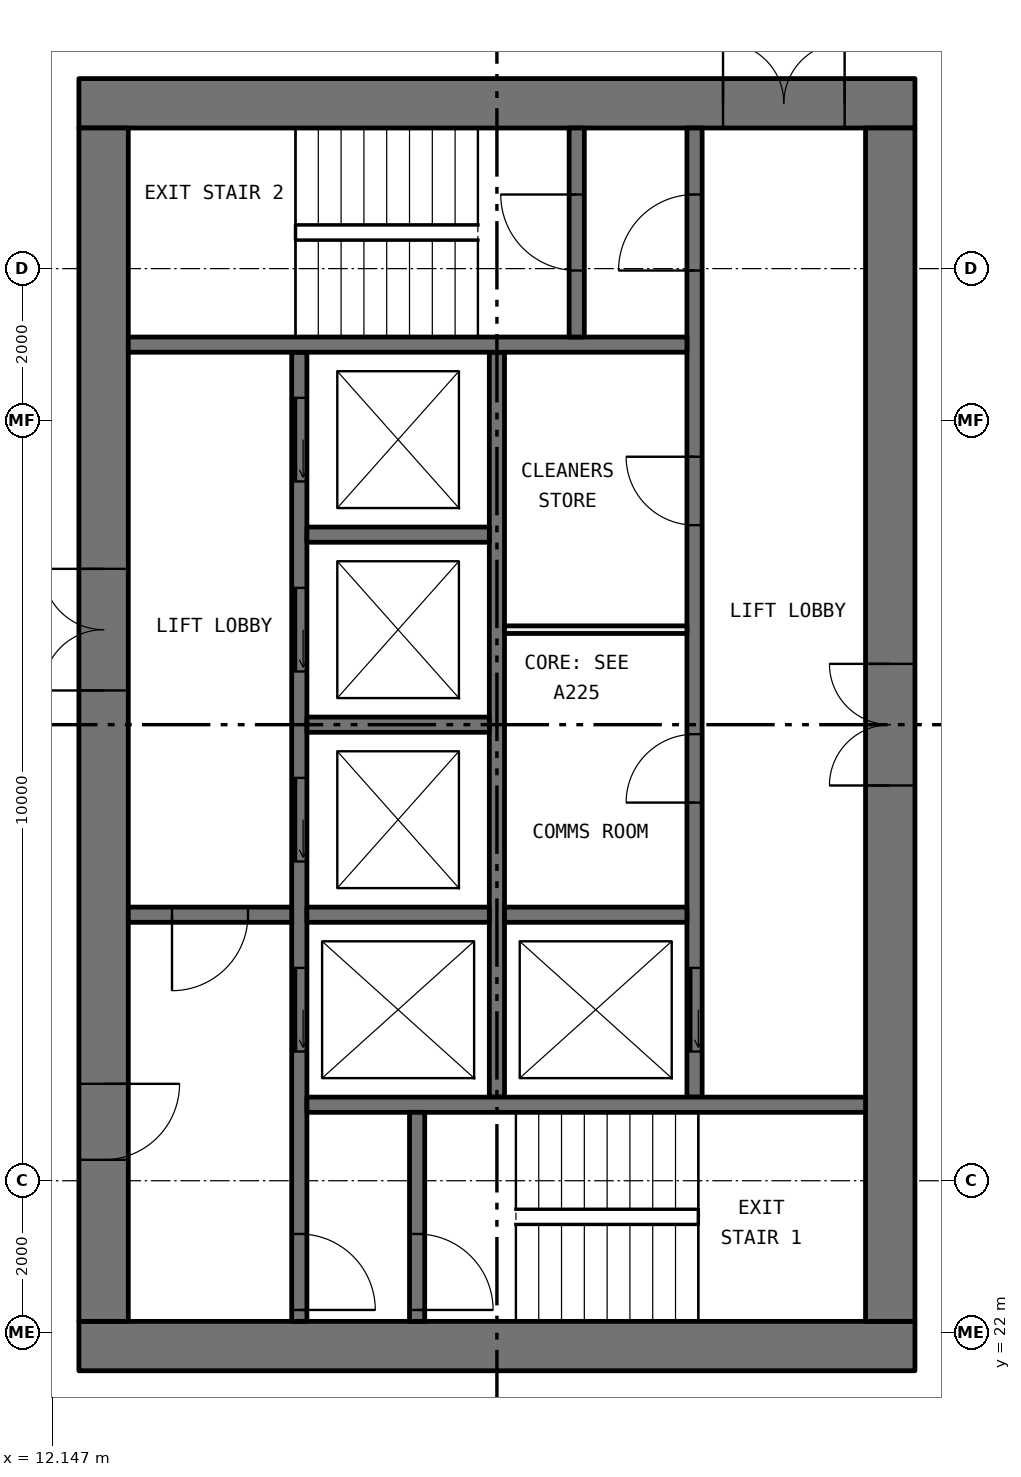
"""IFC4 building model, lengths in metres.
Left out: names, types, materials, properties, quantities, classifications, styles, units other than length and angle.
Written with IfcOpenShell. Run it as: python <this file> out.ifc"""

import sys

from ifc_helpers import new_model, si_unit, direction, frame, frame_2d, origin, place, context, subcontext, project, spatial, rectangle, extrude, element, fill, save


model = new_model("IFC4")
c1 = context("Model", 3, precision=1e-05, world=origin(), true_north=direction((0.0, 1.0)))
c2 = subcontext(c1, "Body", "Model", "MODEL_VIEW")
j1 = project(units=[si_unit("LENGTHUNIT", "METRE"), si_unit("PLANEANGLEUNIT", "RADIAN")], contexts=[c1])
p1 = place(None, origin())
s1 = spatial("IfcSite", under=j1, at=p1, CompositionType="ELEMENT")
p2 = place(p1, origin())
s2 = spatial("IfcBuilding", under=s1, at=p2, CompositionType="ELEMENT")
p3 = place(p2, frame((0.0, 0.0, 96.6)))
s3 = spatial("IfcBuildingStorey", under=s2, at=p3, CompositionType="ELEMENT", Elevation=96.6)
p4 = place(p3, frame((12.5, 21.825, 0.0), z_axis=(0.0, 0.0, 1.0), x_axis=(1.0, 0.0, 0.0)))
e1 = element("IfcWall", 1, at=p4, inside=s3, PredefinedType="SHEAR", context=c2, shape_type="SweptSolid", body=[
    extrude(rectangle(XDim=11.0, YDim=0.65, at=frame_2d((5.5, 0.0))), origin(), (0.0, 0.0, 1.0), 3.05),
])
p5 = place(p3, frame((12.5, 38.175, 0.0), z_axis=(0.0, 0.0, 1.0), x_axis=(1.0, 0.0, 0.0)))
e2 = element("IfcWall", 2, at=p5, inside=s3, PredefinedType="SHEAR", context=c2, shape_type="SweptSolid", body=[
    extrude(rectangle(XDim=11.0, YDim=0.65, at=frame_2d((5.5, 0.0))), origin(), (0.0, 0.0, 1.0), 3.05),
])
p6 = place(p5, frame((8.475, 0.0, 0.0)))
e3 = element("IfcOpeningElement", 3, at=p6, cuts=e2, PredefinedType="OPENING", context=c2, shape_type="SweptSolid", body=[
    extrude(rectangle(XDim=1.6, YDim=2.1, at=frame_2d((0.8, 1.05))), frame((0.0, 0.335, 0.0), z_axis=(0.0, -1.0, 0.0), x_axis=(1.0, 0.0, 0.0)), (0.0, 0.0, 1.0), 0.67),
])
p7 = place(p3, frame((12.825, 22.15, 0.0), z_axis=(0.0, 0.0, 1.0), x_axis=(0.0, 1.0, 0.0)))
e4 = element("IfcWall", 4, at=p7, inside=s3, PredefinedType="SHEAR", context=c2, shape_type="SweptSolid", body=[
    extrude(rectangle(XDim=15.7, YDim=0.65, at=frame_2d((7.85, 0.0))), origin(), (0.0, 0.0, 1.0), 3.05),
])
p8 = place(p7, frame((8.3, 0.0, 0.0)))
e5 = element("IfcOpeningElement", 5, at=p8, cuts=e4, PredefinedType="OPENING", context=c2, shape_type="SweptSolid", body=[
    extrude(rectangle(XDim=1.6, YDim=2.1, at=frame_2d((0.8, 1.05))), frame((0.0, 0.335, 0.0), z_axis=(0.0, -1.0, 0.0), x_axis=(1.0, 0.0, 0.0)), (0.0, 0.0, 1.0), 0.67),
])
p9 = place(p7, frame((2.125, 0.0, 0.0)))
e6 = element("IfcOpeningElement", 6, at=p9, cuts=e4, PredefinedType="OPENING", context=c2, shape_type="SweptSolid", body=[
    extrude(rectangle(XDim=1.0, YDim=2.1, at=frame_2d((0.5, 1.05))), frame((0.0, 0.335, 0.0), z_axis=(0.0, -1.0, 0.0), x_axis=(1.0, 0.0, 0.0)), (0.0, 0.0, 1.0), 0.67),
])
p10 = place(p3, frame((23.175, 22.15, 0.0), z_axis=(0.0, 0.0, 1.0), x_axis=(0.0, 1.0, 0.0)))
e7 = element("IfcWall", 7, at=p10, inside=s3, PredefinedType="SHEAR", context=c2, shape_type="SweptSolid", body=[
    extrude(rectangle(XDim=15.7, YDim=0.65, at=frame_2d((7.85, 0.0))), origin(), (0.0, 0.0, 1.0), 3.05),
])
p11 = place(p10, frame((7.05, 0.0, 0.0)))
e8 = element("IfcOpeningElement", 8, at=p11, cuts=e7, PredefinedType="OPENING", context=c2, shape_type="SweptSolid", body=[
    extrude(rectangle(XDim=1.6, YDim=2.1, at=frame_2d((0.8, 1.05))), frame((0.0, 0.335, 0.0), z_axis=(0.0, -1.0, 0.0), x_axis=(1.0, 0.0, 0.0)), (0.0, 0.0, 1.0), 0.67),
])
p12 = place(p3, frame((15.4, 22.15, 0.0), z_axis=(0.0, 0.0, 1.0), x_axis=(0.0, 1.0, 0.0)))
e9 = element("IfcWall", 9, at=p12, inside=s3, PredefinedType="SOLIDWALL", context=c2, shape_type="SweptSolid", body=[
    extrude(rectangle(XDim=12.75, YDim=0.2, at=frame_2d((6.375, 0.0))), origin(), (0.0, 0.0, 1.0), 3.05),
])
p13 = place(p12, frame((3.55, 0.0, 0.0)))
e10 = element("IfcOpeningElement", 10, at=p13, cuts=e9, PredefinedType="OPENING", context=c2, shape_type="SweptSolid", body=[
    extrude(rectangle(XDim=1.1, YDim=2.1, at=frame_2d((0.55, 1.05))), frame((0.0, 0.11, 0.0), z_axis=(0.0, -1.0, 0.0), x_axis=(1.0, 0.0, 0.0)), (0.0, 0.0, 1.0), 0.22),
])
p14 = place(p12, frame((6.05, 0.0, 0.0)))
e11 = element("IfcOpeningElement", 11, at=p14, cuts=e9, PredefinedType="OPENING", context=c2, shape_type="SweptSolid", body=[
    extrude(rectangle(XDim=1.1, YDim=2.1, at=frame_2d((0.55, 1.05))), frame((0.0, 0.11, 0.0), z_axis=(0.0, -1.0, 0.0), x_axis=(1.0, 0.0, 0.0)), (0.0, 0.0, 1.0), 0.22),
])
p15 = place(p12, frame((8.55, 0.0, 0.0)))
e12 = element("IfcOpeningElement", 12, at=p15, cuts=e9, PredefinedType="OPENING", context=c2, shape_type="SweptSolid", body=[
    extrude(rectangle(XDim=1.1, YDim=2.1, at=frame_2d((0.55, 1.05))), frame((0.0, 0.11, 0.0), z_axis=(0.0, -1.0, 0.0), x_axis=(1.0, 0.0, 0.0)), (0.0, 0.0, 1.0), 0.22),
])
p16 = place(p12, frame((11.05, 0.0, 0.0)))
e13 = element("IfcOpeningElement", 13, at=p16, cuts=e9, PredefinedType="OPENING", context=c2, shape_type="SweptSolid", body=[
    extrude(rectangle(XDim=1.1, YDim=2.1, at=frame_2d((0.55, 1.05))), frame((0.0, 0.11, 0.0), z_axis=(0.0, -1.0, 0.0), x_axis=(1.0, 0.0, 0.0)), (0.0, 0.0, 1.0), 0.22),
])
p17 = place(p12, frame((0.15, 0.0, 0.0)))
e14 = element("IfcOpeningElement", 14, at=p17, cuts=e9, PredefinedType="OPENING", context=c2, shape_type="SweptSolid", body=[
    extrude(rectangle(XDim=1.0, YDim=2.1, at=frame_2d((0.5, 1.05))), frame((0.0, 0.11, 0.0), z_axis=(0.0, -1.0, 0.0), x_axis=(1.0, 0.0, 0.0)), (0.0, 0.0, 1.0), 0.22),
])
p18 = place(p3, frame((20.6, 25.1, 0.0), z_axis=(0.0, 0.0, 1.0), x_axis=(0.0, 1.0, 0.0)))
e15 = element("IfcWall", 15, at=p18, inside=s3, PredefinedType="SOLIDWALL", context=c2, shape_type="SweptSolid", body=[
    extrude(rectangle(XDim=12.75, YDim=0.2, at=frame_2d((6.375, 0.0))), origin(), (0.0, 0.0, 1.0), 3.05),
])
p19 = place(p18, frame((0.6, 0.0, 0.0)))
e16 = element("IfcOpeningElement", 16, at=p19, cuts=e15, PredefinedType="OPENING", context=c2, shape_type="SweptSolid", body=[
    extrude(rectangle(XDim=1.1, YDim=2.1, at=frame_2d((0.55, 1.05))), frame((0.0, 0.11, 0.0), z_axis=(0.0, -1.0, 0.0), x_axis=(1.0, 0.0, 0.0)), (0.0, 0.0, 1.0), 0.22),
])
p20 = place(p18, frame((10.875, 0.0, 0.0)))
e17 = element("IfcOpeningElement", 17, at=p20, cuts=e15, PredefinedType="OPENING", context=c2, shape_type="SweptSolid", body=[
    extrude(rectangle(XDim=1.0, YDim=2.1, at=frame_2d((0.5, 1.05))), frame((0.0, 0.11, 0.0), z_axis=(0.0, -1.0, 0.0), x_axis=(1.0, 0.0, 0.0)), (0.0, 0.0, 1.0), 0.22),
])
p21 = place(p18, frame((3.875, 0.0, 0.0)))
e18 = element("IfcOpeningElement", 18, at=p21, cuts=e15, PredefinedType="OPENING", context=c2, shape_type="SweptSolid", body=[
    extrude(rectangle(XDim=0.9, YDim=2.1, at=frame_2d((0.45, 1.05))), frame((0.0, 0.11, 0.0), z_axis=(0.0, -1.0, 0.0), x_axis=(1.0, 0.0, 0.0)), (0.0, 0.0, 1.0), 0.22),
])
p22 = place(p18, frame((7.525, 0.0, 0.0)))
e19 = element("IfcOpeningElement", 19, at=p22, cuts=e15, PredefinedType="OPENING", context=c2, shape_type="SweptSolid", body=[
    extrude(rectangle(XDim=0.9, YDim=2.1, at=frame_2d((0.45, 1.05))), frame((0.0, 0.11, 0.0), z_axis=(0.0, -1.0, 0.0), x_axis=(1.0, 0.0, 0.0)), (0.0, 0.0, 1.0), 0.22),
])
p23 = place(p3, frame((18.0, 25.1, 0.0), z_axis=(0.0, 0.0, 1.0), x_axis=(0.0, 1.0, 0.0)))
e20 = element("IfcWall", 20, at=p23, inside=s3, PredefinedType="SOLIDWALL", context=c2, shape_type="SweptSolid", body=[
    extrude(rectangle(XDim=9.8, YDim=0.2, at=frame_2d((4.9, 0.0))), origin(), (0.0, 0.0, 1.0), 3.05),
])
for number, where, z_axis, x_axis in (
    (21, (15.5, 25.0, 0.0), (0.0, 0.0, 1.0), (1.0, 0.0, 0.0)),
    (22, (13.15, 35.0, 0.0), (0.0, 0.0, 1.0), (1.0, 0.0, 0.0)),
):
    element("IfcWall", number, at=place(p3, frame(where, z_axis=z_axis, x_axis=x_axis)), inside=s3, PredefinedType="SOLIDWALL", context=c2, shape_type="SweptSolid", body=[
        extrude(rectangle(XDim=7.35, YDim=0.2, at=frame_2d((3.675, 0.0))), origin(), (0.0, 0.0, 1.0), 3.05),
    ])
p24 = place(p3, frame((13.15, 27.5, 0.0), z_axis=(0.0, 0.0, 1.0), x_axis=(1.0, 0.0, 0.0)))
e23 = element("IfcWall", 23, at=p24, inside=s3, PredefinedType="SOLIDWALL", context=c2, shape_type="SweptSolid", body=[
    extrude(rectangle(XDim=2.15, YDim=0.2, at=frame_2d((1.075, 0.0))), origin(), (0.0, 0.0, 1.0), 3.05),
])
p25 = place(p24, frame((0.575, 0.0, 0.0)))
e24 = element("IfcOpeningElement", 24, at=p25, cuts=e23, PredefinedType="OPENING", context=c2, shape_type="SweptSolid", body=[
    extrude(rectangle(XDim=1.0, YDim=2.1, at=frame_2d((0.5, 1.05))), frame((0.0, 0.11, 0.0), z_axis=(0.0, -1.0, 0.0), x_axis=(1.0, 0.0, 0.0)), (0.0, 0.0, 1.0), 0.22),
])
p26 = place(p3, frame((16.95, 22.15, 0.0), z_axis=(0.0, 0.0, 1.0), x_axis=(0.0, 1.0, 0.0)))
e25 = element("IfcWall", 25, at=p26, inside=s3, PredefinedType="SOLIDWALL", context=c2, shape_type="SweptSolid", body=[
    extrude(rectangle(XDim=2.75, YDim=0.2, at=frame_2d((1.375, 0.0))), origin(), (0.0, 0.0, 1.0), 3.05),
])
p27 = place(p26, frame((0.15, 0.0, 0.0)))
e26 = element("IfcOpeningElement", 26, at=p27, cuts=e25, PredefinedType="OPENING", context=c2, shape_type="SweptSolid", body=[
    extrude(rectangle(XDim=1.0, YDim=2.1, at=frame_2d((0.5, 1.05))), frame((0.0, 0.11, 0.0), z_axis=(0.0, -1.0, 0.0), x_axis=(1.0, 0.0, 0.0)), (0.0, 0.0, 1.0), 0.22),
])
p28 = place(p3, frame((19.05, 35.1, 0.0), z_axis=(0.0, 0.0, 1.0), x_axis=(0.0, 1.0, 0.0)))
e27 = element("IfcWall", 27, at=p28, inside=s3, PredefinedType="SOLIDWALL", context=c2, shape_type="SweptSolid", body=[
    extrude(rectangle(XDim=2.75, YDim=0.2, at=frame_2d((1.375, 0.0))), origin(), (0.0, 0.0, 1.0), 3.05),
])
p29 = place(p28, frame((0.875, 0.0, 0.0)))
e28 = element("IfcOpeningElement", 28, at=p29, cuts=e27, PredefinedType="OPENING", context=c2, shape_type="SweptSolid", body=[
    extrude(rectangle(XDim=1.0, YDim=2.1, at=frame_2d((0.5, 1.05))), frame((0.0, 0.11, 0.0), z_axis=(0.0, -1.0, 0.0), x_axis=(1.0, 0.0, 0.0)), (0.0, 0.0, 1.0), 0.22),
])
for number, where, z_axis, x_axis in (
    (29, (15.5, 27.5, 0.0), (0.0, 0.0, 1.0), (1.0, 0.0, 0.0)),
    (30, (15.5, 30.0, 0.0), (0.0, 0.0, 1.0), (1.0, 0.0, 0.0)),
    (31, (15.5, 32.5, 0.0), (0.0, 0.0, 1.0), (1.0, 0.0, 0.0)),
    (32, (18.1, 27.5, 0.0), (0.0, 0.0, 1.0), (1.0, 0.0, 0.0)),
):
    element("IfcWall", number, at=place(p3, frame(where, z_axis=z_axis, x_axis=x_axis)), inside=s3, PredefinedType="SOLIDWALL", context=c2, shape_type="SweptSolid", body=[
        extrude(rectangle(XDim=2.4, YDim=0.2, at=frame_2d((1.2, 0.0))), origin(), (0.0, 0.0, 1.0), 3.05),
    ])
p30 = place(p3, frame((18.1, 31.25, 0.0), z_axis=(0.0, 0.0, 1.0), x_axis=(1.0, 0.0, 0.0)))
e33 = element("IfcWall", 33, at=p30, inside=s3, PredefinedType="PARTITIONING", context=c2, shape_type="SweptSolid", body=[
    extrude(rectangle(XDim=2.4, YDim=0.1, at=frame_2d((1.2, 0.0))), origin(), (0.0, 0.0, 1.0), 3.05),
])
p31 = place(p19, origin())
e34 = element("IfcDoor", 34, at=p31, inside=s3, OperationType="SLIDING_TO_LEFT", PredefinedType="DOOR", context=c2, shape_type="SweptSolid", body=[
    extrude(rectangle(XDim=1.1, YDim=2.1, at=frame_2d((0.55, 1.05))), frame((0.0, 0.025, 0.0), z_axis=(0.0, -1.0, 0.0), x_axis=(1.0, 0.0, 0.0)), (0.0, 0.0, 1.0), 0.05),
])
fill(e16, e34)
p32 = place(p13, origin())
e35 = element("IfcDoor", 35, at=p32, inside=s3, OperationType="SLIDING_TO_LEFT", PredefinedType="DOOR", context=c2, shape_type="SweptSolid", body=[
    extrude(rectangle(XDim=1.1, YDim=2.1, at=frame_2d((0.55, 1.05))), frame((0.0, 0.025, 0.0), z_axis=(0.0, -1.0, 0.0), x_axis=(1.0, 0.0, 0.0)), (0.0, 0.0, 1.0), 0.05),
])
fill(e10, e35)
p33 = place(p14, origin())
e36 = element("IfcDoor", 36, at=p33, inside=s3, OperationType="SLIDING_TO_LEFT", PredefinedType="DOOR", context=c2, shape_type="SweptSolid", body=[
    extrude(rectangle(XDim=1.1, YDim=2.1, at=frame_2d((0.55, 1.05))), frame((0.0, 0.025, 0.0), z_axis=(0.0, -1.0, 0.0), x_axis=(1.0, 0.0, 0.0)), (0.0, 0.0, 1.0), 0.05),
])
fill(e11, e36)
p34 = place(p15, origin())
e37 = element("IfcDoor", 37, at=p34, inside=s3, OperationType="SLIDING_TO_LEFT", PredefinedType="DOOR", context=c2, shape_type="SweptSolid", body=[
    extrude(rectangle(XDim=1.1, YDim=2.1, at=frame_2d((0.55, 1.05))), frame((0.0, 0.025, 0.0), z_axis=(0.0, -1.0, 0.0), x_axis=(1.0, 0.0, 0.0)), (0.0, 0.0, 1.0), 0.05),
])
fill(e12, e37)
p35 = place(p16, origin())
e38 = element("IfcDoor", 38, at=p35, inside=s3, OperationType="SLIDING_TO_LEFT", PredefinedType="DOOR", context=c2, shape_type="SweptSolid", body=[
    extrude(rectangle(XDim=1.1, YDim=2.1, at=frame_2d((0.55, 1.05))), frame((0.0, 0.025, 0.0), z_axis=(0.0, -1.0, 0.0), x_axis=(1.0, 0.0, 0.0)), (0.0, 0.0, 1.0), 0.05),
])
fill(e13, e38)
p36 = place(p27, frame((1.0, 0.0, 0.0), x_axis=(-1.0, 0.0, 0.0)))
e39 = element("IfcDoor", 39, at=p36, inside=s3, OperationType="SINGLE_SWING_LEFT", PredefinedType="DOOR", context=c2, shape_type="SweptSolid", body=[
    extrude(rectangle(XDim=1.0, YDim=2.1, at=frame_2d((0.5, 1.05))), frame((0.0, 0.025, 0.0), z_axis=(0.0, -1.0, 0.0), x_axis=(1.0, 0.0, 0.0)), (0.0, 0.0, 1.0), 0.05),
])
fill(e26, e39)
p37 = place(p17, frame((1.0, 0.0, 0.0), x_axis=(-1.0, 0.0, 0.0)))
e40 = element("IfcDoor", 40, at=p37, inside=s3, OperationType="SINGLE_SWING_LEFT", PredefinedType="DOOR", context=c2, shape_type="SweptSolid", body=[
    extrude(rectangle(XDim=1.0, YDim=2.1, at=frame_2d((0.5, 1.05))), frame((0.0, 0.025, 0.0), z_axis=(0.0, -1.0, 0.0), x_axis=(1.0, 0.0, 0.0)), (0.0, 0.0, 1.0), 0.05),
])
fill(e14, e40)
p38 = place(p20, origin())
e41 = element("IfcDoor", 41, at=p38, inside=s3, OperationType="SINGLE_SWING_RIGHT", PredefinedType="DOOR", context=c2, shape_type="SweptSolid", body=[
    extrude(rectangle(XDim=1.0, YDim=2.1, at=frame_2d((0.5, 1.05))), frame((0.0, 0.025, 0.0), z_axis=(0.0, -1.0, 0.0), x_axis=(1.0, 0.0, 0.0)), (0.0, 0.0, 1.0), 0.05),
])
fill(e17, e41)
p39 = place(p29, origin())
e42 = element("IfcDoor", 42, at=p39, inside=s3, OperationType="SINGLE_SWING_LEFT", PredefinedType="DOOR", context=c2, shape_type="SweptSolid", body=[
    extrude(rectangle(XDim=1.0, YDim=2.1, at=frame_2d((0.5, 1.05))), frame((0.0, 0.025, 0.0), z_axis=(0.0, -1.0, 0.0), x_axis=(1.0, 0.0, 0.0)), (0.0, 0.0, 1.0), 0.05),
])
fill(e28, e42)
p40 = place(p25, frame((1.0, 0.0, 0.0), x_axis=(-1.0, 0.0, 0.0)))
e43 = element("IfcDoor", 43, at=p40, inside=s3, OperationType="SINGLE_SWING_LEFT", PredefinedType="DOOR", context=c2, shape_type="SweptSolid", body=[
    extrude(rectangle(XDim=1.0, YDim=2.1, at=frame_2d((0.5, 1.05))), frame((0.0, 0.025, 0.0), z_axis=(0.0, -1.0, 0.0), x_axis=(1.0, 0.0, 0.0)), (0.0, 0.0, 1.0), 0.05),
])
fill(e24, e43)
p41 = place(p8, origin())
e44 = element("IfcDoor", 44, at=p41, inside=s3, OperationType="DOUBLE_DOOR_SINGLE_SWING", PredefinedType="DOOR", context=c2, shape_type="SweptSolid", body=[
    extrude(rectangle(XDim=1.6, YDim=2.1, at=frame_2d((0.8, 1.05))), frame((0.0, 0.025, 0.0), z_axis=(0.0, -1.0, 0.0), x_axis=(1.0, 0.0, 0.0)), (0.0, 0.0, 1.0), 0.05),
])
fill(e5, e44)
p42 = place(p9, frame((1.0, 0.0, 0.0), x_axis=(-1.0, 0.0, 0.0)))
e45 = element("IfcDoor", 45, at=p42, inside=s3, OperationType="SINGLE_SWING_RIGHT", PredefinedType="DOOR", context=c2, shape_type="SweptSolid", body=[
    extrude(rectangle(XDim=1.0, YDim=2.1, at=frame_2d((0.5, 1.05))), frame((0.0, 0.025, 0.0), z_axis=(0.0, -1.0, 0.0), x_axis=(1.0, 0.0, 0.0)), (0.0, 0.0, 1.0), 0.05),
])
fill(e6, e45)
p43 = place(p6, origin())
e46 = element("IfcDoor", 46, at=p43, inside=s3, OperationType="DOUBLE_DOOR_SINGLE_SWING", PredefinedType="DOOR", context=c2, shape_type="SweptSolid", body=[
    extrude(rectangle(XDim=1.6, YDim=2.1, at=frame_2d((0.8, 1.05))), frame((0.0, 0.025, 0.0), z_axis=(0.0, -1.0, 0.0), x_axis=(1.0, 0.0, 0.0)), (0.0, 0.0, 1.0), 0.05),
])
fill(e3, e46)
p44 = place(p11, origin())
e47 = element("IfcDoor", 47, at=p44, inside=s3, OperationType="DOUBLE_DOOR_SINGLE_SWING", PredefinedType="DOOR", context=c2, shape_type="SweptSolid", body=[
    extrude(rectangle(XDim=1.6, YDim=2.1, at=frame_2d((0.8, 1.05))), frame((0.0, 0.025, 0.0), z_axis=(0.0, -1.0, 0.0), x_axis=(1.0, 0.0, 0.0)), (0.0, 0.0, 1.0), 0.05),
])
fill(e8, e47)
p45 = place(p21, origin())
e48 = element("IfcDoor", 48, at=p45, inside=s3, OperationType="SINGLE_SWING_RIGHT", PredefinedType="DOOR", context=c2, shape_type="SweptSolid", body=[
    extrude(rectangle(XDim=0.9, YDim=2.1, at=frame_2d((0.45, 1.05))), frame((0.0, 0.025, 0.0), z_axis=(0.0, -1.0, 0.0), x_axis=(1.0, 0.0, 0.0)), (0.0, 0.0, 1.0), 0.05),
])
fill(e18, e48)
p46 = place(p22, origin())
e49 = element("IfcDoor", 49, at=p46, inside=s3, OperationType="SINGLE_SWING_LEFT", PredefinedType="DOOR", context=c2, shape_type="SweptSolid", body=[
    extrude(rectangle(XDim=0.9, YDim=2.1, at=frame_2d((0.45, 1.05))), frame((0.0, 0.025, 0.0), z_axis=(0.0, -1.0, 0.0), x_axis=(1.0, 0.0, 0.0)), (0.0, 0.0, 1.0), 0.05),
])
fill(e19, e49)
save(model, sys.argv[1])
